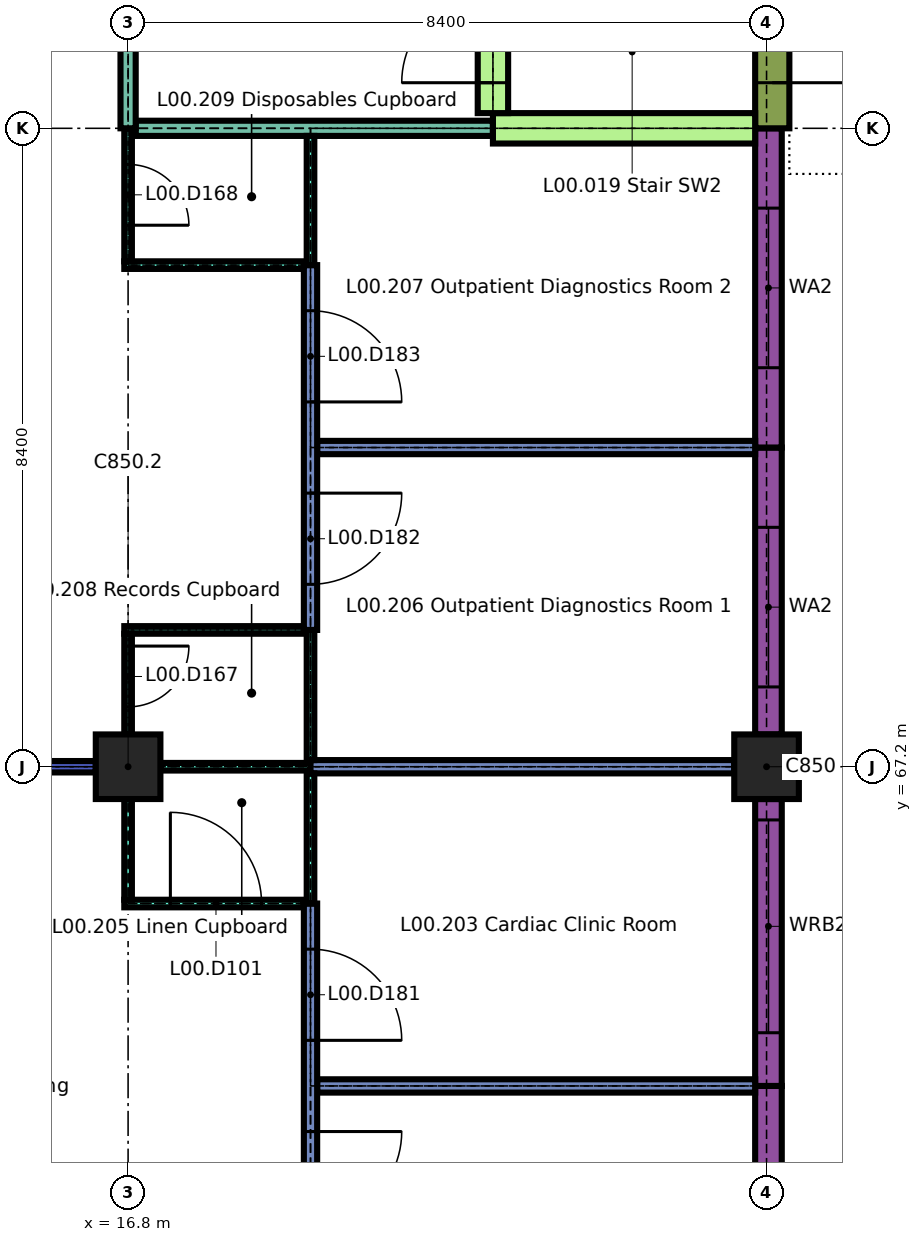
"""IFC4 building model, lengths in metres.
Left out: names, types, materials, properties, quantities, classifications, styles, units other than length and angle.
Written with IfcOpenShell. Run it as: python <this file> out.ifc"""

import sys

from ifc_helpers import new_model, si_unit, direction, frame, frame_2d, origin, origin_2d, place, context, subcontext, project, spatial, rectangle, extrude, element, fill, save


model = new_model("IFC4")
c1 = context("Model", 3, precision=1e-05, world=origin(), true_north=direction((0.0, 1.0)))
c2 = subcontext(c1, "Body", "Model", "MODEL_VIEW")
j1 = project(units=[si_unit("LENGTHUNIT", "METRE"), si_unit("PLANEANGLEUNIT", "RADIAN")], contexts=[c1])
p1 = place(None, origin())
s1 = spatial("IfcSite", under=j1, at=p1, CompositionType="ELEMENT")
p2 = place(p1, origin())
s2 = spatial("IfcBuilding", under=s1, at=p2, CompositionType="ELEMENT")
p3 = place(p2, origin())
s3 = spatial("IfcBuildingStorey", under=s2, at=p3, CompositionType="ELEMENT", Elevation=0.0)
for number, where, z_axis, x_axis in (
    (1, (16.8, 67.2, 0.0), (0.0, 0.0, 1.0), (1.0, 0.0, 0.0)),
    (2, (25.2, 67.2, 0.0), (0.0, 0.0, 1.0), (1.0, 0.0, 0.0)),
):
    element("IfcColumn", number, at=place(p3, frame(where, z_axis=z_axis, x_axis=x_axis)), inside=s3, PredefinedType="COLUMN", context=c2, shape_type="SweptSolid", body=[
        extrude(rectangle(XDim=0.85, YDim=0.85, at=origin_2d()), origin(), (0.0, 0.0, 1.0), 4.14),
    ])
p4 = place(p3, frame((25.225, 59.225, 0.0), z_axis=(0.0, 0.0, 1.0), x_axis=(0.0, 1.0, 0.0)))
e3 = element("IfcWall", 3, at=p4, inside=s3, PredefinedType="SOLIDWALL", context=c2, shape_type="SweptSolid", body=[
    extrude(rectangle(XDim=3.775, YDim=0.35, at=frame_2d((1.887, 0.0))), origin(), (0.0, 0.0, 1.0), 3.84),
])
p5 = place(p4, frame((0.625, 0.0, 0.9)))
e4 = element("IfcOpeningElement", 4, at=p5, cuts=e3, PredefinedType="OPENING", context=c2, shape_type="SweptSolid", body=[
    extrude(rectangle(XDim=2.1, YDim=2.1, at=frame_2d((1.05, 1.05))), frame((0.0, 0.185, 0.0), z_axis=(0.0, -1.0, 0.0), x_axis=(1.0, 0.0, 0.0)), (0.0, 0.0, 1.0), 0.37),
])
p6 = place(p3, frame((25.225, 63.0, 0.0), z_axis=(0.0, 0.0, 1.0), x_axis=(0.0, 1.0, 0.0)))
e5 = element("IfcWall", 5, at=p6, inside=s3, PredefinedType="SOLIDWALL", context=c2, shape_type="SweptSolid", body=[
    extrude(rectangle(XDim=3.775, YDim=0.35, at=frame_2d((1.887, 0.0))), origin(), (0.0, 0.0, 1.0), 3.84),
])
p7 = place(p6, frame((0.7, 0.0, 1.0)))
e6 = element("IfcOpeningElement", 6, at=p7, cuts=e5, PredefinedType="OPENING", context=c2, shape_type="SweptSolid", body=[
    extrude(rectangle(XDim=2.8, YDim=1.5, at=frame_2d((1.4, 0.75))), frame((0.0, 0.185, 0.0), z_axis=(0.0, -1.0, 0.0), x_axis=(1.0, 0.0, 0.0)), (0.0, 0.0, 1.0), 0.37),
])
p8 = place(p3, frame((25.225, 67.625, 0.0), z_axis=(0.0, 0.0, 1.0), x_axis=(0.0, 1.0, 0.0)))
e7 = element("IfcWall", 7, at=p8, inside=s3, PredefinedType="SOLIDWALL", context=c2, shape_type="SweptSolid", body=[
    extrude(rectangle(XDim=3.775, YDim=0.35, at=frame_2d((1.887, 0.0))), origin(), (0.0, 0.0, 1.0), 3.84),
])
p9 = place(p8, frame((0.625, 0.0, 0.9)))
e8 = element("IfcOpeningElement", 8, at=p9, cuts=e7, PredefinedType="OPENING", context=c2, shape_type="SweptSolid", body=[
    extrude(rectangle(XDim=2.1, YDim=2.1, at=frame_2d((1.05, 1.05))), frame((0.0, 0.185, 0.0), z_axis=(0.0, -1.0, 0.0), x_axis=(1.0, 0.0, 0.0)), (0.0, 0.0, 1.0), 0.37),
])
p10 = place(p3, frame((25.225, 71.4, 0.0), z_axis=(0.0, 0.0, 1.0), x_axis=(0.0, 1.0, 0.0)))
e9 = element("IfcWall", 9, at=p10, inside=s3, PredefinedType="SOLIDWALL", context=c2, shape_type="SweptSolid", body=[
    extrude(rectangle(XDim=4.2, YDim=0.35, at=frame_2d((2.1, 0.0))), origin(), (0.0, 0.0, 1.0), 3.84),
])
p11 = place(p10, frame((1.05, 0.0, 0.9)))
e10 = element("IfcOpeningElement", 10, at=p11, cuts=e9, PredefinedType="OPENING", context=c2, shape_type="SweptSolid", body=[
    extrude(rectangle(XDim=2.1, YDim=2.1, at=frame_2d((1.05, 1.05))), frame((0.0, 0.185, 0.0), z_axis=(0.0, -1.0, 0.0), x_axis=(1.0, 0.0, 0.0)), (0.0, 0.0, 1.0), 0.37),
])
p12 = place(p3, frame((25.275, 75.6, 0.0), z_axis=(0.0, 0.0, 1.0), x_axis=(0.0, 1.0, 0.0)))
e11 = element("IfcWall", 11, at=p12, inside=s3, PredefinedType="SOLIDWALL", context=c2, shape_type="SweptSolid", body=[
    extrude(rectangle(XDim=3.7, YDim=0.45, at=frame_2d((1.85, 0.0))), origin(), (0.0, 0.0, 1.0), 4.14),
])
p13 = place(p12, frame((0.6, 0.0, 0.0)))
e12 = element("IfcOpeningElement", 12, at=p13, cuts=e11, PredefinedType="OPENING", context=c2, shape_type="SweptSolid", body=[
    extrude(rectangle(XDim=1.2, YDim=2.1, at=frame_2d((0.6, 1.05))), frame((0.0, 0.235, 0.0), z_axis=(0.0, -1.0, 0.0), x_axis=(1.0, 0.0, 0.0)), (0.0, 0.0, 1.0), 0.47),
])
p14 = place(p3, frame((19.288, 63.0, 0.0), z_axis=(0.0, 0.0, 1.0), x_axis=(1.0, 0.0, 0.0)))
e13 = element("IfcWall", 13, at=p14, inside=s3, PredefinedType="PARTITIONING", context=c2, shape_type="SweptSolid", body=[
    extrude(rectangle(XDim=5.762, YDim=0.175, at=frame_2d((2.881, 0.0))), origin(), (0.0, 0.0, 1.0), 4.14),
])
p15 = place(p3, frame((16.75, 65.4, 0.0), z_axis=(0.0, 0.0, 1.0), x_axis=(1.0, 0.0, 0.0)))
e14 = element("IfcWall", 14, at=p15, inside=s3, PredefinedType="PARTITIONING", context=c2, shape_type="SweptSolid", body=[
    extrude(rectangle(XDim=2.363, YDim=0.1, at=frame_2d((1.181, 0.0))), origin(), (0.0, 0.0, 1.0), 4.14),
])
p16 = place(p15, frame((0.606, 0.0, 0.0)))
e15 = element("IfcOpeningElement", 15, at=p16, cuts=e14, PredefinedType="OPENING", context=c2, shape_type="SweptSolid", body=[
    extrude(rectangle(XDim=1.2, YDim=2.1, at=frame_2d((0.6, 1.05))), frame((0.0, 0.06, 0.0), z_axis=(0.0, -1.0, 0.0), x_axis=(1.0, 0.0, 0.0)), (0.0, 0.0, 1.0), 0.12),
])
p17 = place(p3, frame((11.4, 67.2, 0.0), z_axis=(0.0, 0.0, 1.0), x_axis=(1.0, 0.0, 0.0)))
e16 = element("IfcWall", 16, at=p17, inside=s3, PredefinedType="PARTITIONING", context=c2, shape_type="SweptSolid", body=[
    extrude(rectangle(XDim=4.975, YDim=0.15, at=frame_2d((2.488, 0.0))), origin(), (0.0, 0.0, 1.0), 4.14),
])
p18 = place(p3, frame((17.225, 67.2, 0.0), z_axis=(0.0, 0.0, 1.0), x_axis=(1.0, 0.0, 0.0)))
e17 = element("IfcWall", 17, at=p18, inside=s3, PredefinedType="PARTITIONING", context=c2, shape_type="SweptSolid", body=[
    extrude(rectangle(XDim=1.975, YDim=0.1, at=frame_2d((0.987, 0.0))), origin(), (0.0, 0.0, 1.0), 4.14),
])
p19 = place(p3, frame((19.2, 67.2, 0.0), z_axis=(0.0, 0.0, 1.0), x_axis=(1.0, 0.0, 0.0)))
e18 = element("IfcWall", 18, at=p19, inside=s3, PredefinedType="PARTITIONING", context=c2, shape_type="SweptSolid", body=[
    extrude(rectangle(XDim=5.575, YDim=0.175, at=frame_2d((2.788, 0.0))), origin(), (0.0, 0.0, 1.0), 4.14),
])
p20 = place(p3, frame((16.75, 69.0, 0.0), z_axis=(0.0, 0.0, 1.0), x_axis=(1.0, 0.0, 0.0)))
e19 = element("IfcWall", 19, at=p20, inside=s3, PredefinedType="PARTITIONING", context=c2, shape_type="SweptSolid", body=[
    extrude(rectangle(XDim=2.363, YDim=0.1, at=frame_2d((1.181, 0.0))), origin(), (0.0, 0.0, 1.0), 4.14),
])
p21 = place(p3, frame((19.288, 71.4, 0.0), z_axis=(0.0, 0.0, 1.0), x_axis=(1.0, 0.0, 0.0)))
e20 = element("IfcWall", 20, at=p21, inside=s3, PredefinedType="PARTITIONING", context=c2, shape_type="SweptSolid", body=[
    extrude(rectangle(XDim=5.762, YDim=0.175, at=frame_2d((2.881, 0.0))), origin(), (0.0, 0.0, 1.0), 4.14),
])
p22 = place(p3, frame((16.75, 73.8, 0.0), z_axis=(0.0, 0.0, 1.0), x_axis=(1.0, 0.0, 0.0)))
e21 = element("IfcWall", 21, at=p22, inside=s3, PredefinedType="PARTITIONING", context=c2, shape_type="SweptSolid", body=[
    extrude(rectangle(XDim=2.363, YDim=0.1, at=frame_2d((1.181, 0.0))), origin(), (0.0, 0.0, 1.0), 4.14),
])
p23 = place(p3, frame((16.9, 75.6, 0.0), z_axis=(0.0, 0.0, 1.0), x_axis=(1.0, 0.0, 0.0)))
e22 = element("IfcWall", 22, at=p23, inside=s3, PredefinedType="PARTITIONING", context=c2, shape_type="SweptSolid", body=[
    extrude(rectangle(XDim=4.7, YDim=0.2, at=frame_2d((2.35, 0.0))), origin(), (0.0, 0.0, 1.0), 4.14),
])
p24 = place(p3, frame((21.6, 75.6, 0.0), z_axis=(0.0, 0.0, 1.0), x_axis=(1.0, 0.0, 0.0)))
e23 = element("IfcWall", 23, at=p24, inside=s3, PredefinedType="SHEAR", context=c2, shape_type="SweptSolid", body=[
    extrude(rectangle(XDim=3.45, YDim=0.4, at=frame_2d((1.725, 0.0))), origin(), (0.0, 0.0, 1.0), 4.14),
])
p25 = place(p3, frame((16.8, 65.45, 0.0), z_axis=(0.0, 0.0, 1.0), x_axis=(0.0, 1.0, 0.0)))
e24 = element("IfcWall", 24, at=p25, inside=s3, PredefinedType="PARTITIONING", context=c2, shape_type="SweptSolid", body=[
    extrude(rectangle(XDim=1.325, YDim=0.1, at=frame_2d((0.663, 0.0))), origin(), (0.0, 0.0, 1.0), 4.14),
])
p26 = place(p3, frame((16.8, 67.625, 0.0), z_axis=(0.0, 0.0, 1.0), x_axis=(0.0, 1.0, 0.0)))
e25 = element("IfcWall", 25, at=p26, inside=s3, PredefinedType="PARTITIONING", context=c2, shape_type="SweptSolid", body=[
    extrude(rectangle(XDim=1.325, YDim=0.1, at=frame_2d((0.663, 0.0))), origin(), (0.0, 0.0, 1.0), 4.14),
])
p27 = place(p26, frame((0.363, 0.0, 0.0)))
e26 = element("IfcOpeningElement", 26, at=p27, cuts=e25, PredefinedType="OPENING", context=c2, shape_type="SweptSolid", body=[
    extrude(rectangle(XDim=0.8, YDim=2.1, at=frame_2d((0.4, 1.05))), frame((0.0, 0.06, 0.0), z_axis=(0.0, -1.0, 0.0), x_axis=(1.0, 0.0, 0.0)), (0.0, 0.0, 1.0), 0.12),
])
p28 = place(p3, frame((16.8, 73.85, 0.0), z_axis=(0.0, 0.0, 1.0), x_axis=(0.0, 1.0, 0.0)))
e27 = element("IfcWall", 27, at=p28, inside=s3, PredefinedType="PARTITIONING", context=c2, shape_type="SweptSolid", body=[
    extrude(rectangle(XDim=1.75, YDim=0.1, at=frame_2d((0.875, 0.0))), origin(), (0.0, 0.0, 1.0), 4.14),
])
p29 = place(p28, frame((0.475, 0.0, 0.0)))
e28 = element("IfcOpeningElement", 28, at=p29, cuts=e27, PredefinedType="OPENING", context=c2, shape_type="SweptSolid", body=[
    extrude(rectangle(XDim=0.8, YDim=2.1, at=frame_2d((0.4, 1.05))), frame((0.0, 0.06, 0.0), z_axis=(0.0, -1.0, 0.0), x_axis=(1.0, 0.0, 0.0)), (0.0, 0.0, 1.0), 0.12),
])
p30 = place(p3, frame((16.8, 75.6, 0.0), z_axis=(0.0, 0.0, 1.0), x_axis=(0.0, 1.0, 0.0)))
e29 = element("IfcWall", 29, at=p30, inside=s3, PredefinedType="PARTITIONING", context=c2, shape_type="SweptSolid", body=[
    extrude(rectangle(XDim=8.3, YDim=0.2, at=frame_2d((4.15, 0.0))), origin(), (0.0, 0.0, 1.0), 4.14),
])
p31 = place(p30, frame((3.45, 0.0, 0.0)))
e30 = element("IfcOpeningElement", 30, at=p31, cuts=e29, PredefinedType="OPENING", context=c2, shape_type="SweptSolid", body=[
    extrude(rectangle(XDim=1.4, YDim=2.1, at=frame_2d((0.7, 1.05))), frame((0.0, 0.11, 0.0), z_axis=(0.0, -1.0, 0.0), x_axis=(1.0, 0.0, 0.0)), (0.0, 0.0, 1.0), 0.22),
])
p32 = place(p3, frame((19.2, 60.6, 0.0), z_axis=(0.0, 0.0, 1.0), x_axis=(0.0, 1.0, 0.0)))
e31 = element("IfcWall", 31, at=p32, inside=s3, PredefinedType="PARTITIONING", context=c2, shape_type="SweptSolid", body=[
    extrude(rectangle(XDim=4.8, YDim=0.175, at=frame_2d((2.4, 0.0))), origin(), (0.0, 0.0, 1.0), 4.14),
])
p33 = place(p32, frame((0.6, 0.0, 0.0)))
e32 = element("IfcOpeningElement", 32, at=p33, cuts=e31, PredefinedType="OPENING", context=c2, shape_type="SweptSolid", body=[
    extrude(rectangle(XDim=1.2, YDim=2.1, at=frame_2d((0.6, 1.05))), frame((0.0, 0.097, 0.0), z_axis=(0.0, -1.0, 0.0), x_axis=(1.0, 0.0, 0.0)), (0.0, 0.0, 1.0), 0.195),
])
p34 = place(p32, frame((3.0, 0.0, 0.0)))
e33 = element("IfcOpeningElement", 33, at=p34, cuts=e31, PredefinedType="OPENING", context=c2, shape_type="SweptSolid", body=[
    extrude(rectangle(XDim=1.2, YDim=2.1, at=frame_2d((0.6, 1.05))), frame((0.0, 0.097, 0.0), z_axis=(0.0, -1.0, 0.0), x_axis=(1.0, 0.0, 0.0)), (0.0, 0.0, 1.0), 0.195),
])
p35 = place(p3, frame((19.2, 65.4, 0.0), z_axis=(0.0, 0.0, 1.0), x_axis=(0.0, 1.0, 0.0)))
e34 = element("IfcWall", 34, at=p35, inside=s3, PredefinedType="PARTITIONING", context=c2, shape_type="SweptSolid", body=[
    extrude(rectangle(XDim=1.713, YDim=0.1, at=frame_2d((0.856, 0.0))), origin(), (0.0, 0.0, 1.0), 4.14),
])
p36 = place(p3, frame((19.2, 67.288, 0.0), z_axis=(0.0, 0.0, 1.0), x_axis=(0.0, 1.0, 0.0)))
e35 = element("IfcWall", 35, at=p36, inside=s3, PredefinedType="PARTITIONING", context=c2, shape_type="SweptSolid", body=[
    extrude(rectangle(XDim=1.712, YDim=0.1, at=frame_2d((0.856, 0.0))), origin(), (0.0, 0.0, 1.0), 4.14),
])
p37 = place(p3, frame((19.2, 69.0, 0.0), z_axis=(0.0, 0.0, 1.0), x_axis=(0.0, 1.0, 0.0)))
e36 = element("IfcWall", 36, at=p37, inside=s3, PredefinedType="PARTITIONING", context=c2, shape_type="SweptSolid", body=[
    extrude(rectangle(XDim=4.8, YDim=0.175, at=frame_2d((2.4, 0.0))), origin(), (0.0, 0.0, 1.0), 4.14),
])
p38 = place(p37, frame((0.6, 0.0, 0.0)))
e37 = element("IfcOpeningElement", 37, at=p38, cuts=e36, PredefinedType="OPENING", context=c2, shape_type="SweptSolid", body=[
    extrude(rectangle(XDim=1.2, YDim=2.1, at=frame_2d((0.6, 1.05))), frame((0.0, 0.097, 0.0), z_axis=(0.0, -1.0, 0.0), x_axis=(1.0, 0.0, 0.0)), (0.0, 0.0, 1.0), 0.195),
])
p39 = place(p37, frame((3.0, 0.0, 0.0)))
e38 = element("IfcOpeningElement", 38, at=p39, cuts=e36, PredefinedType="OPENING", context=c2, shape_type="SweptSolid", body=[
    extrude(rectangle(XDim=1.2, YDim=2.1, at=frame_2d((0.6, 1.05))), frame((0.0, 0.097, 0.0), z_axis=(0.0, -1.0, 0.0), x_axis=(1.0, 0.0, 0.0)), (0.0, 0.0, 1.0), 0.195),
])
p40 = place(p3, frame((19.2, 73.8, 0.0), z_axis=(0.0, 0.0, 1.0), x_axis=(0.0, 1.0, 0.0)))
e39 = element("IfcWall", 39, at=p40, inside=s3, PredefinedType="PARTITIONING", context=c2, shape_type="SweptSolid", body=[
    extrude(rectangle(XDim=1.7, YDim=0.1, at=frame_2d((0.85, 0.0))), origin(), (0.0, 0.0, 1.0), 4.14),
])
p41 = place(p3, frame((21.6, 75.8, 0.0), z_axis=(0.0, 0.0, 1.0), x_axis=(0.0, 1.0, 0.0)))
e40 = element("IfcWall", 40, at=p41, inside=s3, PredefinedType="SHEAR", context=c2, shape_type="SweptSolid", body=[
    extrude(rectangle(XDim=8.0, YDim=0.4, at=frame_2d((4.0, 0.0))), origin(), (0.0, 0.0, 1.0), 4.14),
])
p42 = place(p41, frame((0.4, 0.0, 0.0)))
e41 = element("IfcOpeningElement", 41, at=p42, cuts=e40, PredefinedType="OPENING", context=c2, shape_type="SweptSolid", body=[
    extrude(rectangle(XDim=1.2, YDim=2.1, at=frame_2d((0.6, 1.05))), frame((0.0, 0.21, 0.0), z_axis=(0.0, -1.0, 0.0), x_axis=(1.0, 0.0, 0.0)), (0.0, 0.0, 1.0), 0.42),
])
p43 = place(p7, origin())
e42 = element("IfcWindow", 42, at=p43, inside=s3, PartitioningType="DOUBLE_PANEL_VERTICAL", PredefinedType="WINDOW", context=c2, shape_type="SweptSolid", body=[
    extrude(rectangle(XDim=2.8, YDim=1.5, at=frame_2d((1.4, 0.75))), frame((0.0, 0.03, 0.0), z_axis=(0.0, -1.0, 0.0), x_axis=(1.0, 0.0, 0.0)), (0.0, 0.0, 1.0), 0.06),
])
fill(e6, e42)
p44 = place(p9, origin())
e43 = element("IfcWindow", 43, at=p44, inside=s3, PartitioningType="DOUBLE_PANEL_VERTICAL", PredefinedType="WINDOW", context=c2, shape_type="SweptSolid", body=[
    extrude(rectangle(XDim=2.1, YDim=2.1, at=frame_2d((1.05, 1.05))), frame((0.0, 0.03, 0.0), z_axis=(0.0, -1.0, 0.0), x_axis=(1.0, 0.0, 0.0)), (0.0, 0.0, 1.0), 0.06),
])
fill(e8, e43)
p45 = place(p11, origin())
e44 = element("IfcWindow", 44, at=p45, inside=s3, PartitioningType="DOUBLE_PANEL_VERTICAL", PredefinedType="WINDOW", context=c2, shape_type="SweptSolid", body=[
    extrude(rectangle(XDim=2.1, YDim=2.1, at=frame_2d((1.05, 1.05))), frame((0.0, 0.03, 0.0), z_axis=(0.0, -1.0, 0.0), x_axis=(1.0, 0.0, 0.0)), (0.0, 0.0, 1.0), 0.06),
])
fill(e10, e44)
p46 = place(p13, frame((1.2, 0.0, 0.0), x_axis=(-1.0, 0.0, 0.0)))
e45 = element("IfcDoor", 45, at=p46, inside=s3, OperationType="SINGLE_SWING_LEFT", PredefinedType="DOOR", context=c2, shape_type="SweptSolid", body=[
    extrude(rectangle(XDim=1.2, YDim=2.1, at=frame_2d((0.6, 1.05))), frame((0.0, 0.025, 0.0), z_axis=(0.0, -1.0, 0.0), x_axis=(1.0, 0.0, 0.0)), (0.0, 0.0, 1.0), 0.05),
])
fill(e12, e45)
p47 = place(p16, origin())
e46 = element("IfcDoor", 46, at=p47, inside=s3, OperationType="SINGLE_SWING_RIGHT", PredefinedType="DOOR", context=c2, shape_type="SweptSolid", body=[
    extrude(rectangle(XDim=1.2, YDim=2.1, at=frame_2d((0.6, 1.05))), frame((0.0, 0.02, 0.0), z_axis=(0.0, -1.0, 0.0), x_axis=(1.0, 0.0, 0.0)), (0.0, 0.0, 1.0), 0.04),
])
fill(e15, e46)
p48 = place(p27, origin())
e47 = element("IfcDoor", 47, at=p48, inside=s3, OperationType="SINGLE_SWING_RIGHT", PredefinedType="DOOR", context=c2, shape_type="SweptSolid", body=[
    extrude(rectangle(XDim=0.8, YDim=2.1, at=frame_2d((0.4, 1.05))), frame((0.0, 0.02, 0.0), z_axis=(0.0, -1.0, 0.0), x_axis=(1.0, 0.0, 0.0)), (0.0, 0.0, 1.0), 0.04),
])
fill(e26, e47)
p49 = place(p29, origin())
e48 = element("IfcDoor", 48, at=p49, inside=s3, OperationType="SINGLE_SWING_LEFT", PredefinedType="DOOR", context=c2, shape_type="SweptSolid", body=[
    extrude(rectangle(XDim=0.8, YDim=2.1, at=frame_2d((0.4, 1.05))), frame((0.0, 0.02, 0.0), z_axis=(0.0, -1.0, 0.0), x_axis=(1.0, 0.0, 0.0)), (0.0, 0.0, 1.0), 0.04),
])
fill(e28, e48)
p50 = place(p33, origin())
e49 = element("IfcDoor", 49, at=p50, inside=s3, OperationType="SINGLE_SWING_RIGHT", PredefinedType="DOOR", context=c2, shape_type="SweptSolid", body=[
    extrude(rectangle(XDim=1.2, YDim=2.1, at=frame_2d((0.6, 1.05))), frame((0.0, 0.035, 0.0), z_axis=(0.0, -1.0, 0.0), x_axis=(1.0, 0.0, 0.0)), (0.0, 0.0, 1.0), 0.07),
])
fill(e32, e49)
p51 = place(p34, origin())
e50 = element("IfcDoor", 50, at=p51, inside=s3, OperationType="SINGLE_SWING_LEFT", PredefinedType="DOOR", context=c2, shape_type="SweptSolid", body=[
    extrude(rectangle(XDim=1.2, YDim=2.1, at=frame_2d((0.6, 1.05))), frame((0.0, 0.035, 0.0), z_axis=(0.0, -1.0, 0.0), x_axis=(1.0, 0.0, 0.0)), (0.0, 0.0, 1.0), 0.07),
])
fill(e33, e50)
p52 = place(p38, origin())
e51 = element("IfcDoor", 51, at=p52, inside=s3, OperationType="SINGLE_SWING_RIGHT", PredefinedType="DOOR", context=c2, shape_type="SweptSolid", body=[
    extrude(rectangle(XDim=1.2, YDim=2.1, at=frame_2d((0.6, 1.05))), frame((0.0, 0.035, 0.0), z_axis=(0.0, -1.0, 0.0), x_axis=(1.0, 0.0, 0.0)), (0.0, 0.0, 1.0), 0.07),
])
fill(e37, e51)
p53 = place(p39, origin())
e52 = element("IfcDoor", 52, at=p53, inside=s3, OperationType="SINGLE_SWING_LEFT", PredefinedType="DOOR", context=c2, shape_type="SweptSolid", body=[
    extrude(rectangle(XDim=1.2, YDim=2.1, at=frame_2d((0.6, 1.05))), frame((0.0, 0.035, 0.0), z_axis=(0.0, -1.0, 0.0), x_axis=(1.0, 0.0, 0.0)), (0.0, 0.0, 1.0), 0.07),
])
fill(e38, e52)
p54 = place(p42, origin())
e53 = element("IfcDoor", 53, at=p54, inside=s3, OperationType="SINGLE_SWING_RIGHT", PredefinedType="DOOR", context=c2, shape_type="SweptSolid", body=[
    extrude(rectangle(XDim=1.2, YDim=2.1, at=frame_2d((0.6, 1.05))), frame((0.0, 0.025, 0.0), z_axis=(0.0, -1.0, 0.0), x_axis=(1.0, 0.0, 0.0)), (0.0, 0.0, 1.0), 0.05),
])
fill(e41, e53)
save(model, sys.argv[1])
